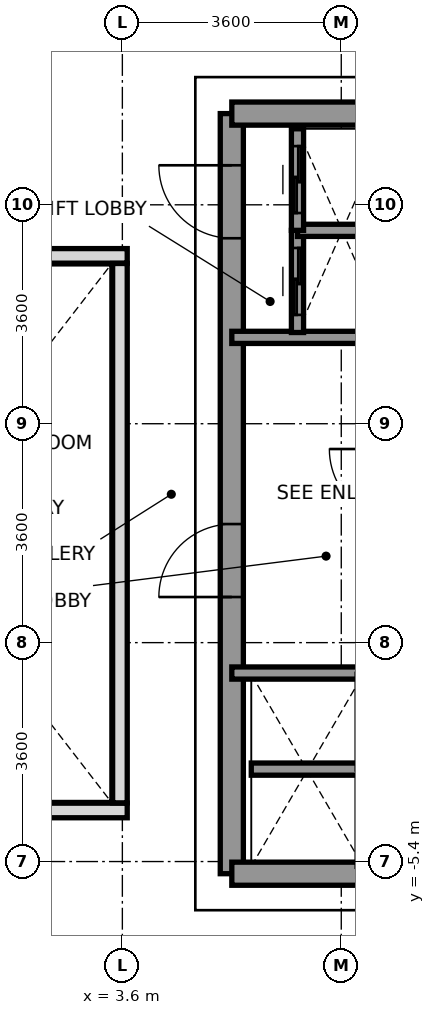
"""IFC4 building model, lengths in metres.
Left out: names, types, materials, properties, quantities, classifications, styles, units other than length and angle.
Written with IfcOpenShell. Run it as: python <this file> out.ifc"""

import sys

from ifc_helpers import new_model, si_unit, direction, frame, frame_2d, origin, place, context, subcontext, project, spatial, rectangle, extrude, source, transform, mapped, element, fill, save


model = new_model("IFC4")
c1 = context("Model", 3, precision=1e-05, world=origin(), true_north=direction((0.0, 1.0)))
c2 = subcontext(c1, "Body", "Model", "MODEL_VIEW")
j1 = project(units=[si_unit("LENGTHUNIT", "METRE"), si_unit("PLANEANGLEUNIT", "RADIAN")], contexts=[c1])
p1 = place(None, origin())
s1 = spatial("IfcSite", under=j1, at=p1, CompositionType="ELEMENT")
p2 = place(p1, origin())
s2 = spatial("IfcBuilding", under=s1, at=p2, CompositionType="ELEMENT")
p3 = place(p2, frame((0.0, 0.0, 180.8)))
s3 = spatial("IfcBuildingStorey", under=s2, at=p3, CompositionType="ELEMENT", Elevation=180.8)
p4 = place(p3, frame((5.4, -5.6, 0.0), z_axis=(0.0, 0.0, 1.0), x_axis=(0.0, 1.0, 0.0)))
e1 = element("IfcWall", 1, at=p4, inside=s3, PredefinedType="SHEAR", context=c2, shape_type="SweptSolid", body=[
    extrude(rectangle(XDim=12.5, YDim=0.38, at=frame_2d((6.25, 0.0))), origin(), (0.0, 0.0, 1.0), 3.2),
])
p5 = place(p4, frame((4.55, 0.0, 0.0)))
e2 = element("IfcOpeningElement", 2, at=p5, cuts=e1, PredefinedType="OPENING", context=c2, shape_type="SweptSolid", body=[
    extrude(rectangle(XDim=1.2, YDim=2.2, at=frame_2d((0.6, 1.1))), frame((0.0, 0.2, 0.0), z_axis=(0.0, -1.0, 0.0), x_axis=(1.0, 0.0, 0.0)), (0.0, 0.0, 1.0), 0.4),
])
p6 = place(p4, frame((10.45, 0.0, 0.0)))
e3 = element("IfcOpeningElement", 3, at=p6, cuts=e1, PredefinedType="OPENING", context=c2, shape_type="SweptSolid", body=[
    extrude(rectangle(XDim=1.2, YDim=2.2, at=frame_2d((0.6, 1.1))), frame((0.0, 0.2, 0.0), z_axis=(0.0, -1.0, 0.0), x_axis=(1.0, 0.0, 0.0)), (0.0, 0.0, 1.0), 0.4),
])
p7 = place(p3, frame((5.4, 6.9, 0.0), z_axis=(0.0, 0.0, 1.0), x_axis=(1.0, 0.0, 0.0)))
e4 = element("IfcWall", 4, at=p7, inside=s3, PredefinedType="SHEAR", context=c2, shape_type="SweptSolid", body=[
    extrude(rectangle(XDim=5.956, YDim=0.38, at=frame_2d((2.978, 0.0))), origin(), (0.0, 0.0, 1.0), 3.2),
])
p8 = place(p3, frame((5.4, -5.6, 0.0), z_axis=(0.0, 0.0, 1.0), x_axis=(1.0, 0.0, 0.0)))
e5 = element("IfcWall", 5, at=p8, inside=s3, PredefinedType="SHEAR", context=c2, shape_type="SweptSolid", body=[
    extrude(rectangle(XDim=7.8, YDim=0.38, at=frame_2d((3.9, 0.0))), origin(), (0.0, 0.0, 1.0), 3.2),
])
p9 = place(p8, frame((5.85, 0.0, 0.0)))
e6 = element("IfcOpeningElement", 6, at=p9, cuts=e5, PredefinedType="OPENING", context=c2, shape_type="SweptSolid", body=[
    extrude(rectangle(XDim=0.8, YDim=2.1, at=frame_2d((0.4, 1.05))), frame((0.0, 0.2, 0.0), z_axis=(0.0, -1.0, 0.0), x_axis=(1.0, 0.0, 0.0)), (0.0, 0.0, 1.0), 0.4),
])
p10 = place(p3, frame((5.4, 3.22, 0.0), z_axis=(0.0, 0.0, 1.0), x_axis=(1.0, 0.0, 0.0)))
e7 = element("IfcWall", 7, at=p10, inside=s3, PredefinedType="SOLIDWALL", context=c2, shape_type="SweptSolid", body=[
    extrude(rectangle(XDim=2.78, YDim=0.2, at=frame_2d((1.39, 0.0))), origin(), (0.0, 0.0, 1.0), 3.2),
])
p11 = place(p3, frame((5.4, -2.3, 0.0), z_axis=(0.0, 0.0, 1.0), x_axis=(1.0, 0.0, 0.0)))
e8 = element("IfcWall", 8, at=p11, inside=s3, PredefinedType="SOLIDWALL", context=c2, shape_type="SweptSolid", body=[
    extrude(rectangle(XDim=3.08, YDim=0.2, at=frame_2d((1.54, 0.0))), origin(), (0.0, 0.0, 1.0), 3.2),
])
p12 = place(p3, frame((5.72, -3.88, 0.0), z_axis=(0.0, 0.0, 1.0), x_axis=(1.0, 0.0, 0.0)))
e9 = element("IfcWall", 9, at=p12, inside=s3, PredefinedType="SOLIDWALL", context=c2, shape_type="SweptSolid", body=[
    extrude(rectangle(XDim=1.84, YDim=0.2, at=frame_2d((0.92, 0.0))), origin(), (0.0, 0.0, 1.0), 3.2),
])
p13 = place(p3, frame((6.48, 3.3, 0.0), z_axis=(0.0, 0.0, 1.0), x_axis=(0.0, 1.0, 0.0)))
e10 = element("IfcWall", 10, at=p13, inside=s3, PredefinedType="SOLIDWALL", context=c2, shape_type="SweptSolid", body=[
    extrude(rectangle(XDim=1.68, YDim=0.2, at=frame_2d((0.84, 0.0))), origin(), (0.0, 0.0, 1.0), 3.2),
])
p14 = place(p13, frame((0.29, 0.0, 0.0)))
e11 = element("IfcOpeningElement", 11, at=p14, cuts=e10, PredefinedType="OPENING", context=c2, shape_type="SweptSolid", body=[
    extrude(rectangle(XDim=1.1, YDim=2.2, at=frame_2d((0.55, 1.1))), frame((0.0, 0.11, 0.0), z_axis=(0.0, -1.0, 0.0), x_axis=(1.0, 0.0, 0.0)), (0.0, 0.0, 1.0), 0.22),
])
p15 = place(p3, frame((6.48, 4.98, 0.0), z_axis=(0.0, 0.0, 1.0), x_axis=(1.0, 0.0, 0.0)))
e12 = element("IfcWall", 12, at=p15, inside=s3, PredefinedType="SOLIDWALL", context=c2, shape_type="SweptSolid", body=[
    extrude(rectangle(XDim=1.47, YDim=0.2, at=frame_2d((0.735, 0.0))), origin(), (0.0, 0.0, 1.0), 3.2),
])
p16 = place(p3, frame((6.48, 4.98, 0.0), z_axis=(0.0, 0.0, 1.0), x_axis=(0.0, 1.0, 0.0)))
e13 = element("IfcWall", 13, at=p16, inside=s3, PredefinedType="SOLIDWALL", context=c2, shape_type="SweptSolid", body=[
    extrude(rectangle(XDim=1.67, YDim=0.2, at=frame_2d((0.835, 0.0))), origin(), (0.0, 0.0, 1.0), 3.2),
])
p17 = place(p16, frame((0.285, 0.0, 0.0)))
e14 = element("IfcOpeningElement", 14, at=p17, cuts=e13, PredefinedType="OPENING", context=c2, shape_type="SweptSolid", body=[
    extrude(rectangle(XDim=1.1, YDim=2.2, at=frame_2d((0.55, 1.1))), frame((0.0, 0.11, 0.0), z_axis=(0.0, -1.0, 0.0), x_axis=(1.0, 0.0, 0.0)), (0.0, 0.0, 1.0), 0.22),
])
for number, where, z_axis, x_axis in (
    (15, (-3.68, -4.56, 0.0), (0.0, 0.0, 1.0), (1.0, 0.0, 0.0)),
    (16, (-3.68, 4.56, 0.0), (0.0, 0.0, 1.0), (1.0, 0.0, 0.0)),
):
    element("IfcWall", number, at=place(p3, frame(where, z_axis=z_axis, x_axis=x_axis)), inside=s3, PredefinedType="PARAPET", context=c2, shape_type="SweptSolid", body=[
        extrude(rectangle(XDim=7.36, YDim=0.24, at=frame_2d((3.68, 0.0))), origin(), (0.0, 0.0, 1.0), 1.15),
    ])
p18 = place(p3, frame((3.56, -4.435, 0.0), z_axis=(0.0, 0.0, 1.0), x_axis=(0.0, 1.0, 0.0)))
e17 = element("IfcWall", 17, at=p18, inside=s3, PredefinedType="PARAPET", context=c2, shape_type="SweptSolid", body=[
    extrude(rectangle(XDim=8.87, YDim=0.24, at=frame_2d((4.435, 0.0))), origin(), (0.0, 0.0, 1.0), 1.15),
])
m1 = source(origin(), c2, "Body", "SweptSolid", [
    extrude(rectangle(XDim=1.2, YDim=2.2, at=frame_2d((0.6, 1.1))), frame((0.0, 0.025, 0.0), z_axis=(0.0, -1.0, 0.0), x_axis=(1.0, 0.0, 0.0)), (0.0, 0.0, 1.0), 0.05),
])
p19 = place(p5, origin())
e18 = element("IfcDoor", 18, at=p19, inside=s3, OperationType="SINGLE_SWING_LEFT", PredefinedType="DOOR", context=c2, shape_type="MappedRepresentation", body=[
    mapped(m1, transform((0.0, 0.0, 0.0), x_axis=(1.0, 0.0, 0.0), y_axis=(0.0, 1.0, 0.0), z_axis=(0.0, 0.0, 1.0), scale=1.0)),
])
fill(e2, e18)
p20 = place(p6, origin())
e19 = element("IfcDoor", 19, at=p20, inside=s3, OperationType="SINGLE_SWING_RIGHT", PredefinedType="DOOR", context=c2, shape_type="MappedRepresentation", body=[
    mapped(m1, transform((0.0, 0.0, 0.0), x_axis=(1.0, 0.0, 0.0), y_axis=(0.0, 1.0, 0.0), z_axis=(0.0, 0.0, 1.0), scale=1.0)),
])
fill(e3, e19)
m2 = source(origin(), c2, "Body", "SweptSolid", [
    extrude(rectangle(XDim=1.1, YDim=2.2, at=frame_2d((0.55, 1.1))), frame((0.0, 0.025, 0.0), z_axis=(0.0, -1.0, 0.0), x_axis=(1.0, 0.0, 0.0)), (0.0, 0.0, 1.0), 0.05),
])
p21 = place(p14, origin())
e20 = element("IfcDoor", 20, at=p21, inside=s3, OperationType="SLIDING_TO_LEFT", PredefinedType="DOOR", context=c2, shape_type="MappedRepresentation", body=[
    mapped(m2, transform((0.0, 0.0, 0.0), x_axis=(1.0, 0.0, 0.0), y_axis=(0.0, 1.0, 0.0), z_axis=(0.0, 0.0, 1.0), scale=1.0)),
])
fill(e11, e20)
p22 = place(p17, origin())
e21 = element("IfcDoor", 21, at=p22, inside=s3, OperationType="SLIDING_TO_LEFT", PredefinedType="DOOR", context=c2, shape_type="MappedRepresentation", body=[
    mapped(m2, transform((0.0, 0.0, 0.0), x_axis=(1.0, 0.0, 0.0), y_axis=(0.0, 1.0, 0.0), z_axis=(0.0, 0.0, 1.0), scale=1.0)),
])
fill(e14, e21)
save(model, sys.argv[1])
